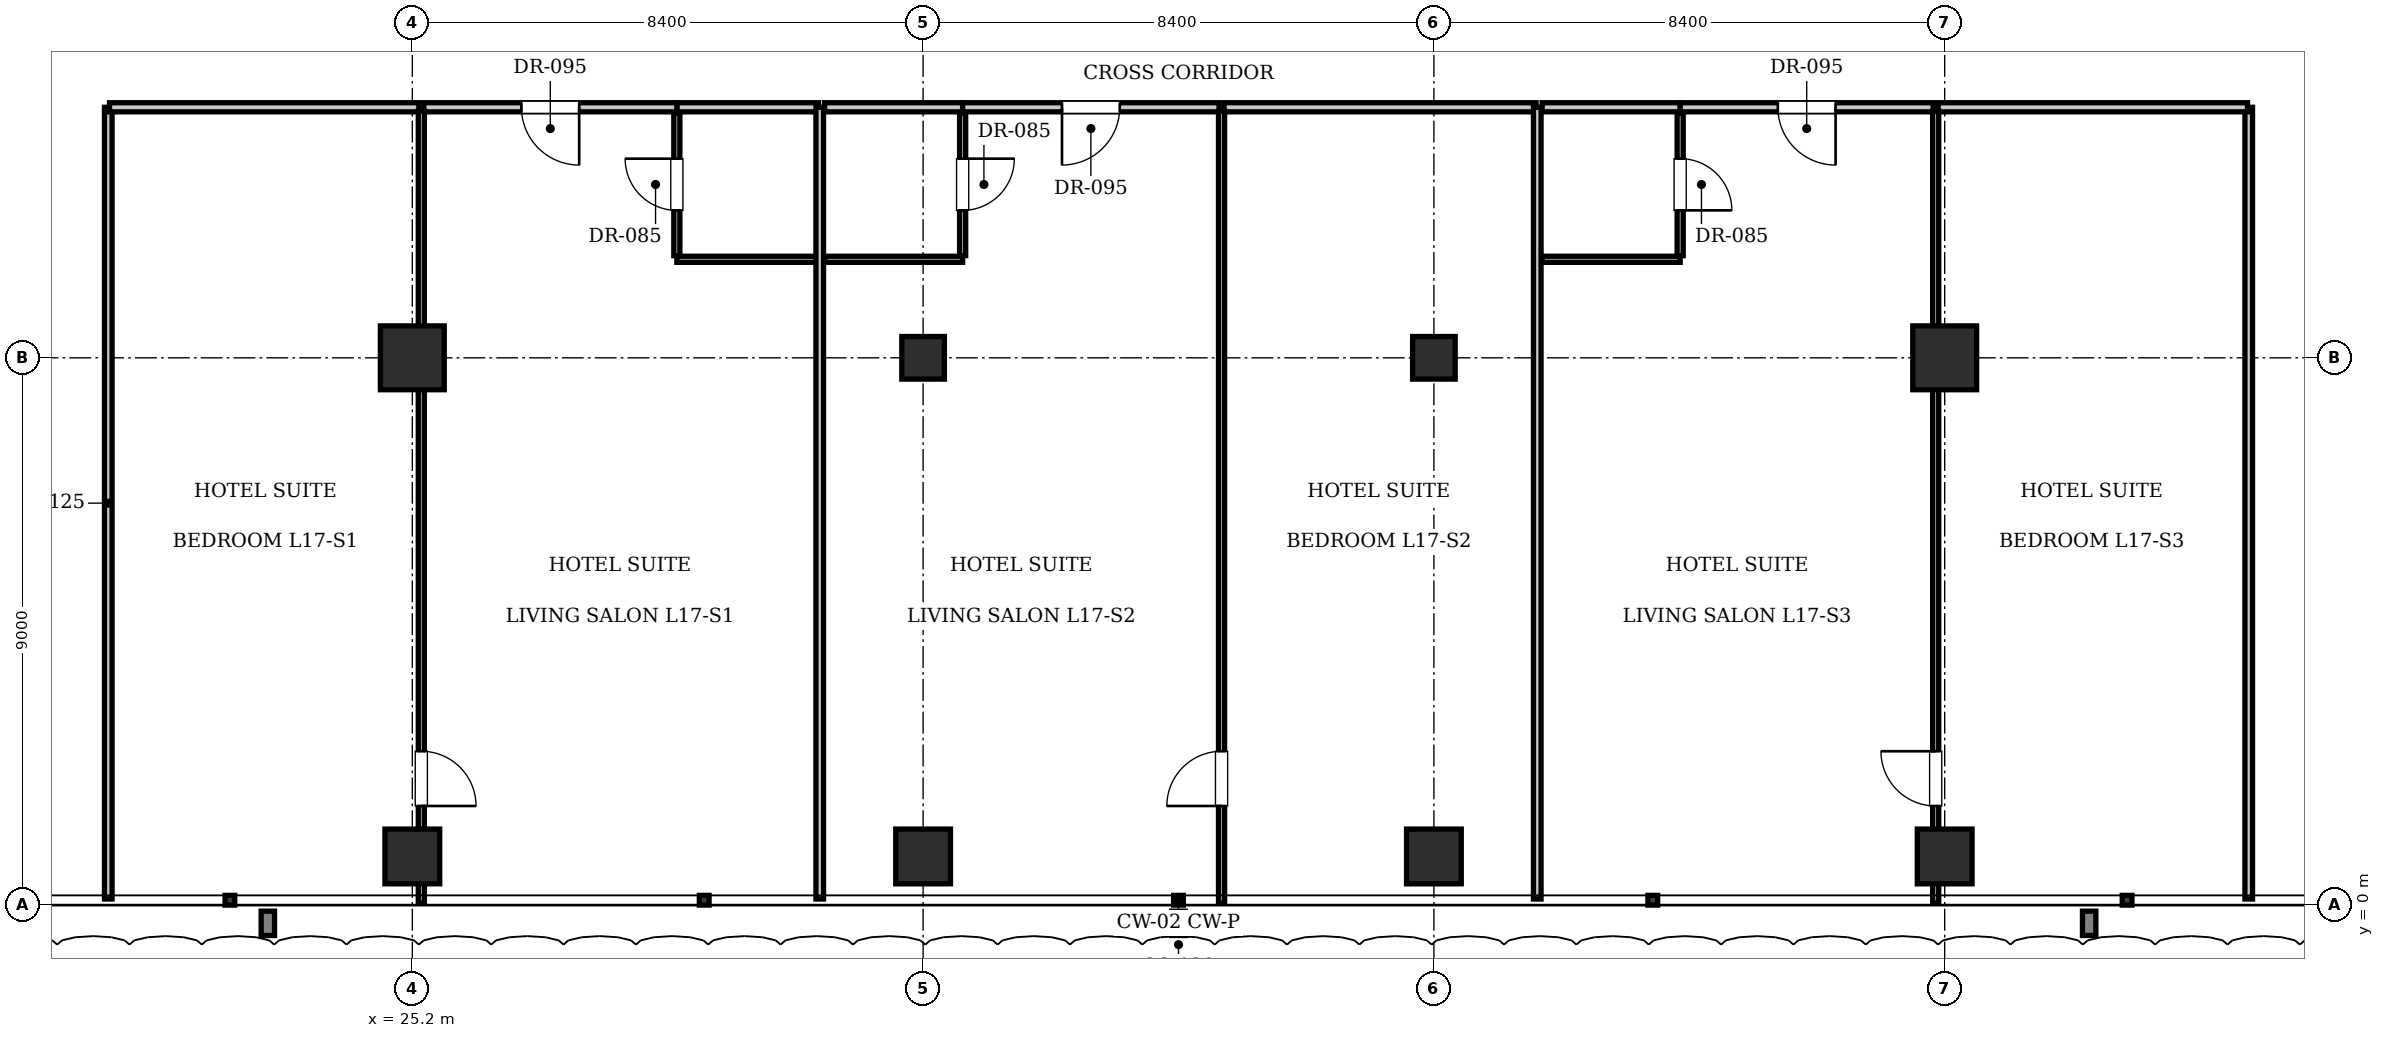
"""IFC4 building model, lengths in metres.
Left out: names, types, materials, properties, quantities, classifications, styles, units other than length and angle.
Written with IfcOpenShell. Run it as: python <this file> out.ifc"""

import sys

from ifc_helpers import new_model, si_unit, direction, frame, frame_2d, origin, origin_2d, place, context, subcontext, project, spatial, rectangle, i_section, extrude, element, fill, save


model = new_model("IFC4")
c1 = context("Model", 3, precision=1e-05, world=origin(), true_north=direction((0.0, 1.0)))
c2 = subcontext(c1, "Body", "Model", "MODEL_VIEW")
j1 = project(units=[si_unit("LENGTHUNIT", "METRE"), si_unit("PLANEANGLEUNIT", "RADIAN")], contexts=[c1])
p1 = place(None, origin())
s1 = spatial("IfcSite", under=j1, at=p1, CompositionType="ELEMENT")
p2 = place(p1, origin())
s2 = spatial("IfcBuilding", under=s1, at=p2, CompositionType="ELEMENT")
p3 = place(p2, frame((0.0, 0.0, 73.15)))
s3 = spatial("IfcBuildingStorey", under=s2, at=p3, CompositionType="ELEMENT", Elevation=73.15)
for number, where, z_axis, x_axis in (
    (1, (25.2, 9.0, 0.0), (0.0, 0.0, 1.0), (1.0, 0.0, 0.0)),
    (2, (50.4, 9.0, 0.0), (0.0, 0.0, 1.0), (1.0, 0.0, 0.0)),
):
    element("IfcColumn", number, at=place(p3, frame(where, z_axis=z_axis, x_axis=x_axis)), inside=s3, PredefinedType="COLUMN", context=c2, shape_type="SweptSolid", body=[
        extrude(rectangle(XDim=1.05, YDim=1.05, at=origin_2d()), origin(), (0.0, 0.0, 1.0), 3.85),
    ])
for number, where, z_axis, x_axis in (
    (3, (33.6, 9.0, 0.0), (0.0, 0.0, 1.0), (1.0, 0.0, 0.0)),
    (4, (42.0, 9.0, 0.0), (0.0, 0.0, 1.0), (1.0, 0.0, 0.0)),
):
    element("IfcColumn", number, at=place(p3, frame(where, z_axis=z_axis, x_axis=x_axis)), inside=s3, PredefinedType="COLUMN", context=c2, shape_type="SweptSolid", body=[
        extrude(i_section(OverallWidth=0.7, OverallDepth=0.7, WebThickness=0.028, FlangeThickness=0.044, at=origin_2d()), origin(), (0.0, 0.0, 1.0), 3.85),
    ])
for number, where, z_axis, x_axis in (
    (5, (25.2, 0.8, 0.0), (0.0, 0.0, 1.0), (1.0, 0.0, 0.0)),
    (6, (33.6, 0.8, 0.0), (0.0, 0.0, 1.0), (1.0, 0.0, 0.0)),
    (7, (42.0, 0.8, 0.0), (0.0, 0.0, 1.0), (1.0, 0.0, 0.0)),
    (8, (50.4, 0.8, 0.0), (0.0, 0.0, 1.0), (1.0, 0.0, 0.0)),
):
    element("IfcColumn", number, at=place(p3, frame(where, z_axis=z_axis, x_axis=x_axis)), inside=s3, PredefinedType="COLUMN", context=c2, shape_type="SweptSolid", body=[
        extrude(rectangle(XDim=0.9, YDim=0.9, at=origin_2d()), origin(), (0.0, 0.0, 1.0), 3.85),
    ])
for number, where, z_axis, x_axis in (
    (9, (20.2, 0.1, 0.0), (0.0, 0.0, 1.0), (0.0, 1.0, 0.0)),
    (10, (55.4, 0.1, 0.0), (0.0, 0.0, 1.0), (0.0, 1.0, 0.0)),
):
    element("IfcWall", number, at=place(p3, frame(where, z_axis=z_axis, x_axis=x_axis)), inside=s3, PredefinedType="PARTITIONING", context=c2, shape_type="SweptSolid", body=[
        extrude(rectangle(XDim=13.02, YDim=0.125, at=frame_2d((6.51, 0.0))), origin(), (0.0, 0.0, 1.0), 3.61),
    ])
p4 = place(p3, frame((29.55, 13.12, 0.0), z_axis=(0.0, 0.0, 1.0), x_axis=(1.0, 0.0, 0.0)))
e11 = element("IfcWall", 11, at=p4, inside=s3, PredefinedType="PARTITIONING", context=c2, shape_type="SweptSolid", body=[
    extrude(rectangle(XDim=2.33, YDim=0.15, at=frame_2d((1.165, 0.0))), origin(), (0.0, 0.0, 1.0), 3.61),
])
p5 = place(p3, frame((29.55, 10.62, 0.0), z_axis=(0.0, 0.0, 1.0), x_axis=(1.0, 0.0, 0.0)))
e12 = element("IfcWall", 12, at=p5, inside=s3, PredefinedType="PARTITIONING", context=c2, shape_type="SweptSolid", body=[
    extrude(rectangle(XDim=2.31, YDim=0.1, at=frame_2d((1.155, 0.0))), origin(), (0.0, 0.0, 1.0), 3.61),
])
p6 = place(p3, frame((29.55, 10.68, 0.0), z_axis=(0.0, 0.0, 1.0), x_axis=(0.0, 1.0, 0.0)))
e13 = element("IfcWall", 13, at=p6, inside=s3, PredefinedType="PARTITIONING", context=c2, shape_type="SweptSolid", body=[
    extrude(rectangle(XDim=2.34, YDim=0.1, at=frame_2d((1.17, 0.0))), origin(), (0.0, 0.0, 1.0), 3.61),
])
p7 = place(p6, frame((0.745, 0.0, 0.0)))
e14 = element("IfcOpeningElement", 14, at=p7, cuts=e13, PredefinedType="OPENING", context=c2, shape_type="SweptSolid", body=[
    extrude(rectangle(XDim=0.85, YDim=2.1, at=frame_2d((0.425, 1.05))), frame((0.0, 0.06, 0.0), z_axis=(0.0, -1.0, 0.0), x_axis=(1.0, 0.0, 0.0)), (0.0, 0.0, 1.0), 0.12),
])
p8 = place(p3, frame((20.22, 13.12, 0.0), z_axis=(0.0, 0.0, 1.0), x_axis=(1.0, 0.0, 0.0)))
e15 = element("IfcWall", 15, at=p8, inside=s3, PredefinedType="PARTITIONING", context=c2, shape_type="SweptSolid", body=[
    extrude(rectangle(XDim=5.088, YDim=0.15, at=frame_2d((2.544, 0.0))), origin(), (0.0, 0.0, 1.0), 3.61),
])
p9 = place(p3, frame((25.388, 13.12, 0.0), z_axis=(0.0, 0.0, 1.0), x_axis=(1.0, 0.0, 0.0)))
e16 = element("IfcWall", 16, at=p9, inside=s3, PredefinedType="PARTITIONING", context=c2, shape_type="SweptSolid", body=[
    extrude(rectangle(XDim=4.162, YDim=0.15, at=frame_2d((2.081, 0.0))), origin(), (0.0, 0.0, 1.0), 3.61),
])
p10 = place(p9, frame((1.606, 0.0, 0.0)))
e17 = element("IfcOpeningElement", 17, at=p10, cuts=e16, PredefinedType="OPENING", context=c2, shape_type="SweptSolid", body=[
    extrude(rectangle(XDim=0.95, YDim=2.15, at=frame_2d((0.475, 1.075))), frame((0.0, 0.085, 0.0), z_axis=(0.0, -1.0, 0.0), x_axis=(1.0, 0.0, 0.0)), (0.0, 0.0, 1.0), 0.17),
])
p11 = place(p3, frame((25.348, 0.03, 0.0), z_axis=(0.0, 0.0, 1.0), x_axis=(0.0, 1.0, 0.0)))
e18 = element("IfcWall", 18, at=p11, inside=s3, PredefinedType="PARTITIONING", context=c2, shape_type="SweptSolid", body=[
    extrude(rectangle(XDim=13.03, YDim=0.1, at=frame_2d((6.515, 0.0))), origin(), (0.0, 0.0, 1.0), 2.999),
])
p12 = place(p11, frame((1.6, 0.0, 0.0)))
e19 = element("IfcOpeningElement", 19, at=p12, cuts=e18, PredefinedType="OPENING", context=c2, shape_type="SweptSolid", body=[
    extrude(rectangle(XDim=0.9, YDim=2.1, at=frame_2d((0.45, 1.05))), frame((0.0, 0.06, 0.0), z_axis=(0.0, -1.0, 0.0), x_axis=(1.0, 0.0, 0.0)), (0.0, 0.0, 1.0), 0.12),
])
p13 = place(p3, frame((31.9, 0.1, 0.0), z_axis=(0.0, 0.0, 1.0), x_axis=(0.0, 1.0, 0.0)))
e20 = element("IfcWall", 20, at=p13, inside=s3, PredefinedType="PARTITIONING", context=c2, shape_type="SweptSolid", body=[
    extrude(rectangle(XDim=13.02, YDim=0.125, at=frame_2d((6.51, 0.0))), origin(), (0.0, 0.0, 1.0), 3.61),
])
p14 = place(p3, frame((31.98, 13.12, 0.0), z_axis=(0.0, 0.0, 1.0), x_axis=(1.0, 0.0, 0.0)))
e21 = element("IfcWall", 21, at=p14, inside=s3, PredefinedType="PARTITIONING", context=c2, shape_type="SweptSolid", body=[
    extrude(rectangle(XDim=2.27, YDim=0.15, at=frame_2d((1.135, 0.0))), origin(), (0.0, 0.0, 1.0), 3.61),
])
p15 = place(p3, frame((31.98, 10.62, 0.0), z_axis=(0.0, 0.0, 1.0), x_axis=(1.0, 0.0, 0.0)))
e22 = element("IfcWall", 22, at=p15, inside=s3, PredefinedType="PARTITIONING", context=c2, shape_type="SweptSolid", body=[
    extrude(rectangle(XDim=2.27, YDim=0.1, at=frame_2d((1.135, 0.0))), origin(), (0.0, 0.0, 1.0), 3.61),
])
p16 = place(p3, frame((34.25, 10.68, 0.0), z_axis=(0.0, 0.0, 1.0), x_axis=(0.0, 1.0, 0.0)))
e23 = element("IfcWall", 23, at=p16, inside=s3, PredefinedType="PARTITIONING", context=c2, shape_type="SweptSolid", body=[
    extrude(rectangle(XDim=2.34, YDim=0.1, at=frame_2d((1.17, 0.0))), origin(), (0.0, 0.0, 1.0), 3.61),
])
p17 = place(p16, frame((0.745, 0.0, 0.0)))
e24 = element("IfcOpeningElement", 24, at=p17, cuts=e23, PredefinedType="OPENING", context=c2, shape_type="SweptSolid", body=[
    extrude(rectangle(XDim=0.85, YDim=2.1, at=frame_2d((0.425, 1.05))), frame((0.0, 0.06, 0.0), z_axis=(0.0, -1.0, 0.0), x_axis=(1.0, 0.0, 0.0)), (0.0, 0.0, 1.0), 0.12),
])
p18 = place(p3, frame((34.25, 13.12, 0.0), z_axis=(0.0, 0.0, 1.0), x_axis=(1.0, 0.0, 0.0)))
e25 = element("IfcWall", 25, at=p18, inside=s3, PredefinedType="PARTITIONING", context=c2, shape_type="SweptSolid", body=[
    extrude(rectangle(XDim=4.218, YDim=0.15, at=frame_2d((2.109, 0.0))), origin(), (0.0, 0.0, 1.0), 3.61),
])
p19 = place(p18, frame((1.634, 0.0, 0.0)))
e26 = element("IfcOpeningElement", 26, at=p19, cuts=e25, PredefinedType="OPENING", context=c2, shape_type="SweptSolid", body=[
    extrude(rectangle(XDim=0.95, YDim=2.15, at=frame_2d((0.475, 1.075))), frame((0.0, 0.085, 0.0), z_axis=(0.0, -1.0, 0.0), x_axis=(1.0, 0.0, 0.0)), (0.0, 0.0, 1.0), 0.17),
])
p20 = place(p3, frame((38.548, 13.12, 0.0), z_axis=(0.0, 0.0, 1.0), x_axis=(1.0, 0.0, 0.0)))
e27 = element("IfcWall", 27, at=p20, inside=s3, PredefinedType="PARTITIONING", context=c2, shape_type="SweptSolid", body=[
    extrude(rectangle(XDim=5.132, YDim=0.15, at=frame_2d((2.566, 0.0))), origin(), (0.0, 0.0, 1.0), 3.61),
])
p21 = place(p3, frame((38.508, 0.03, 0.0), z_axis=(0.0, 0.0, 1.0), x_axis=(0.0, 1.0, 0.0)))
e28 = element("IfcWall", 28, at=p21, inside=s3, PredefinedType="PARTITIONING", context=c2, shape_type="SweptSolid", body=[
    extrude(rectangle(XDim=13.03, YDim=0.1, at=frame_2d((6.515, 0.0))), origin(), (0.0, 0.0, 1.0), 3.61),
])
p22 = place(p21, frame((1.6, 0.0, 0.0)))
e29 = element("IfcOpeningElement", 29, at=p22, cuts=e28, PredefinedType="OPENING", context=c2, shape_type="SweptSolid", body=[
    extrude(rectangle(XDim=0.9, YDim=2.1, at=frame_2d((0.45, 1.05))), frame((0.0, 0.06, 0.0), z_axis=(0.0, -1.0, 0.0), x_axis=(1.0, 0.0, 0.0)), (0.0, 0.0, 1.0), 0.12),
])
p23 = place(p3, frame((43.7, 0.1, 0.0), z_axis=(0.0, 0.0, 1.0), x_axis=(0.0, 1.0, 0.0)))
e30 = element("IfcWall", 30, at=p23, inside=s3, PredefinedType="PARTITIONING", context=c2, shape_type="SweptSolid", body=[
    extrude(rectangle(XDim=13.02, YDim=0.125, at=frame_2d((6.51, 0.0))), origin(), (0.0, 0.0, 1.0), 3.61),
])
p24 = place(p3, frame((43.78, 13.12, 0.0), z_axis=(0.0, 0.0, 1.0), x_axis=(1.0, 0.0, 0.0)))
e31 = element("IfcWall", 31, at=p24, inside=s3, PredefinedType="PARTITIONING", context=c2, shape_type="SweptSolid", body=[
    extrude(rectangle(XDim=2.27, YDim=0.15, at=frame_2d((1.135, 0.0))), origin(), (0.0, 0.0, 1.0), 3.61),
])
p25 = place(p3, frame((43.78, 10.62, 0.0), z_axis=(0.0, 0.0, 1.0), x_axis=(1.0, 0.0, 0.0)))
e32 = element("IfcWall", 32, at=p25, inside=s3, PredefinedType="PARTITIONING", context=c2, shape_type="SweptSolid", body=[
    extrude(rectangle(XDim=2.27, YDim=0.1, at=frame_2d((1.135, 0.0))), origin(), (0.0, 0.0, 1.0), 3.61),
])
p26 = place(p3, frame((46.05, 10.68, 0.0), z_axis=(0.0, 0.0, 1.0), x_axis=(0.0, 1.0, 0.0)))
e33 = element("IfcWall", 33, at=p26, inside=s3, PredefinedType="PARTITIONING", context=c2, shape_type="SweptSolid", body=[
    extrude(rectangle(XDim=2.34, YDim=0.1, at=frame_2d((1.17, 0.0))), origin(), (0.0, 0.0, 1.0), 3.304),
])
p27 = place(p26, frame((0.745, 0.0, 0.0)))
e34 = element("IfcOpeningElement", 34, at=p27, cuts=e33, PredefinedType="OPENING", context=c2, shape_type="SweptSolid", body=[
    extrude(rectangle(XDim=0.85, YDim=2.1, at=frame_2d((0.425, 1.05))), frame((0.0, 0.06, 0.0), z_axis=(0.0, -1.0, 0.0), x_axis=(1.0, 0.0, 0.0)), (0.0, 0.0, 1.0), 0.12),
])
p28 = place(p3, frame((46.05, 13.12, 0.0), z_axis=(0.0, 0.0, 1.0), x_axis=(1.0, 0.0, 0.0)))
e35 = element("IfcWall", 35, at=p28, inside=s3, PredefinedType="PARTITIONING", context=c2, shape_type="SweptSolid", body=[
    extrude(rectangle(XDim=4.162, YDim=0.15, at=frame_2d((2.081, 0.0))), origin(), (0.0, 0.0, 1.0), 3.61),
])
p29 = place(p28, frame((1.606, 0.0, 0.0)))
e36 = element("IfcOpeningElement", 36, at=p29, cuts=e35, PredefinedType="OPENING", context=c2, shape_type="SweptSolid", body=[
    extrude(rectangle(XDim=0.95, YDim=2.15, at=frame_2d((0.475, 1.075))), frame((0.0, 0.085, 0.0), z_axis=(0.0, -1.0, 0.0), x_axis=(1.0, 0.0, 0.0)), (0.0, 0.0, 1.0), 0.17),
])
p30 = place(p3, frame((50.292, 13.12, 0.0), z_axis=(0.0, 0.0, 1.0), x_axis=(1.0, 0.0, 0.0)))
e37 = element("IfcWall", 37, at=p30, inside=s3, PredefinedType="PARTITIONING", context=c2, shape_type="SweptSolid", body=[
    extrude(rectangle(XDim=5.088, YDim=0.15, at=frame_2d((2.544, 0.0))), origin(), (0.0, 0.0, 1.0), 3.61),
])
p31 = place(p3, frame((50.252, 0.03, 0.0), z_axis=(0.0, 0.0, 1.0), x_axis=(0.0, 1.0, 0.0)))
e38 = element("IfcWall", 38, at=p31, inside=s3, PredefinedType="PARTITIONING", context=c2, shape_type="SweptSolid", body=[
    extrude(rectangle(XDim=13.03, YDim=0.1, at=frame_2d((6.515, 0.0))), origin(), (0.0, 0.0, 1.0), 2.999),
])
p32 = place(p31, frame((1.6, 0.0, 0.0)))
e39 = element("IfcOpeningElement", 39, at=p32, cuts=e38, PredefinedType="OPENING", context=c2, shape_type="SweptSolid", body=[
    extrude(rectangle(XDim=0.9, YDim=2.1, at=frame_2d((0.45, 1.05))), frame((0.0, 0.06, 0.0), z_axis=(0.0, -1.0, 0.0), x_axis=(1.0, 0.0, 0.0)), (0.0, 0.0, 1.0), 0.12),
])
p33 = place(p7, origin())
e40 = element("IfcDoor", 40, at=p33, inside=s3, OperationType="SINGLE_SWING_RIGHT", PredefinedType="DOOR", context=c2, shape_type="SweptSolid", body=[
    extrude(rectangle(XDim=0.85, YDim=2.1, at=frame_2d((0.425, 1.05))), frame((0.0, 0.025, 0.0), z_axis=(0.0, -1.0, 0.0), x_axis=(1.0, 0.0, 0.0)), (0.0, 0.0, 1.0), 0.05),
])
fill(e14, e40)
p34 = place(p10, frame((0.95, 0.0, 0.0), z_axis=(0.0, 0.0, 1.0), x_axis=(-1.0, 0.0, 0.0)))
e41 = element("IfcDoor", 41, at=p34, inside=s3, OperationType="SINGLE_SWING_LEFT", PredefinedType="DOOR", context=c2, shape_type="SweptSolid", body=[
    extrude(rectangle(XDim=0.95, YDim=2.15, at=frame_2d((0.475, 1.075))), frame((0.0, 0.025, 0.0), z_axis=(0.0, -1.0, 0.0), x_axis=(1.0, 0.0, 0.0)), (0.0, 0.0, 1.0), 0.05),
])
fill(e17, e41)
p35 = place(p12, frame((0.9, 0.0, 0.0), z_axis=(0.0, 0.0, 1.0), x_axis=(-1.0, 0.0, 0.0)))
e42 = element("IfcDoor", 42, at=p35, inside=s3, OperationType="SINGLE_SWING_RIGHT", PredefinedType="DOOR", context=c2, shape_type="SweptSolid", body=[
    extrude(rectangle(XDim=0.9, YDim=2.1, at=frame_2d((0.45, 1.05))), frame((0.0, 0.025, 0.0), z_axis=(0.0, -1.0, 0.0), x_axis=(1.0, 0.0, 0.0)), (0.0, 0.0, 1.0), 0.05),
])
fill(e19, e42)
p36 = place(p17, frame((0.85, 0.0, 0.0), z_axis=(0.0, 0.0, 1.0), x_axis=(-1.0, 0.0, 0.0)))
e43 = element("IfcDoor", 43, at=p36, inside=s3, OperationType="SINGLE_SWING_LEFT", PredefinedType="DOOR", context=c2, shape_type="SweptSolid", body=[
    extrude(rectangle(XDim=0.85, YDim=2.1, at=frame_2d((0.425, 1.05))), frame((0.0, 0.025, 0.0), z_axis=(0.0, -1.0, 0.0), x_axis=(1.0, 0.0, 0.0)), (0.0, 0.0, 1.0), 0.05),
])
fill(e24, e43)
p37 = place(p19, frame((0.95, 0.0, 0.0), z_axis=(0.0, 0.0, 1.0), x_axis=(-1.0, 0.0, 0.0)))
e44 = element("IfcDoor", 44, at=p37, inside=s3, OperationType="SINGLE_SWING_RIGHT", PredefinedType="DOOR", context=c2, shape_type="SweptSolid", body=[
    extrude(rectangle(XDim=0.95, YDim=2.15, at=frame_2d((0.475, 1.075))), frame((0.0, 0.025, 0.0), z_axis=(0.0, -1.0, 0.0), x_axis=(1.0, 0.0, 0.0)), (0.0, 0.0, 1.0), 0.05),
])
fill(e26, e44)
p38 = place(p22, origin())
e45 = element("IfcDoor", 45, at=p38, inside=s3, OperationType="SINGLE_SWING_LEFT", PredefinedType="DOOR", context=c2, shape_type="SweptSolid", body=[
    extrude(rectangle(XDim=0.9, YDim=2.1, at=frame_2d((0.45, 1.05))), frame((0.0, 0.025, 0.0), z_axis=(0.0, -1.0, 0.0), x_axis=(1.0, 0.0, 0.0)), (0.0, 0.0, 1.0), 0.05),
])
fill(e29, e45)
p39 = place(p27, frame((0.85, 0.0, 0.0), z_axis=(0.0, 0.0, 1.0), x_axis=(-1.0, 0.0, 0.0)))
e46 = element("IfcDoor", 46, at=p39, inside=s3, OperationType="SINGLE_SWING_RIGHT", PredefinedType="DOOR", context=c2, shape_type="SweptSolid", body=[
    extrude(rectangle(XDim=0.85, YDim=2.1, at=frame_2d((0.425, 1.05))), frame((0.0, 0.025, 0.0), z_axis=(0.0, -1.0, 0.0), x_axis=(1.0, 0.0, 0.0)), (0.0, 0.0, 1.0), 0.05),
])
fill(e34, e46)
p40 = place(p29, frame((0.95, 0.0, 0.0), z_axis=(0.0, 0.0, 1.0), x_axis=(-1.0, 0.0, 0.0)))
e47 = element("IfcDoor", 47, at=p40, inside=s3, OperationType="SINGLE_SWING_LEFT", PredefinedType="DOOR", context=c2, shape_type="SweptSolid", body=[
    extrude(rectangle(XDim=0.95, YDim=2.15, at=frame_2d((0.475, 1.075))), frame((0.0, 0.025, 0.0), z_axis=(0.0, -1.0, 0.0), x_axis=(1.0, 0.0, 0.0)), (0.0, 0.0, 1.0), 0.05),
])
fill(e36, e47)
p41 = place(p32, origin())
e48 = element("IfcDoor", 48, at=p41, inside=s3, OperationType="SINGLE_SWING_RIGHT", PredefinedType="DOOR", context=c2, shape_type="SweptSolid", body=[
    extrude(rectangle(XDim=0.9, YDim=2.1, at=frame_2d((0.45, 1.05))), frame((0.0, 0.025, 0.0), z_axis=(0.0, -1.0, 0.0), x_axis=(1.0, 0.0, 0.0)), (0.0, 0.0, 1.0), 0.05),
])
fill(e39, e48)
save(model, sys.argv[1])
